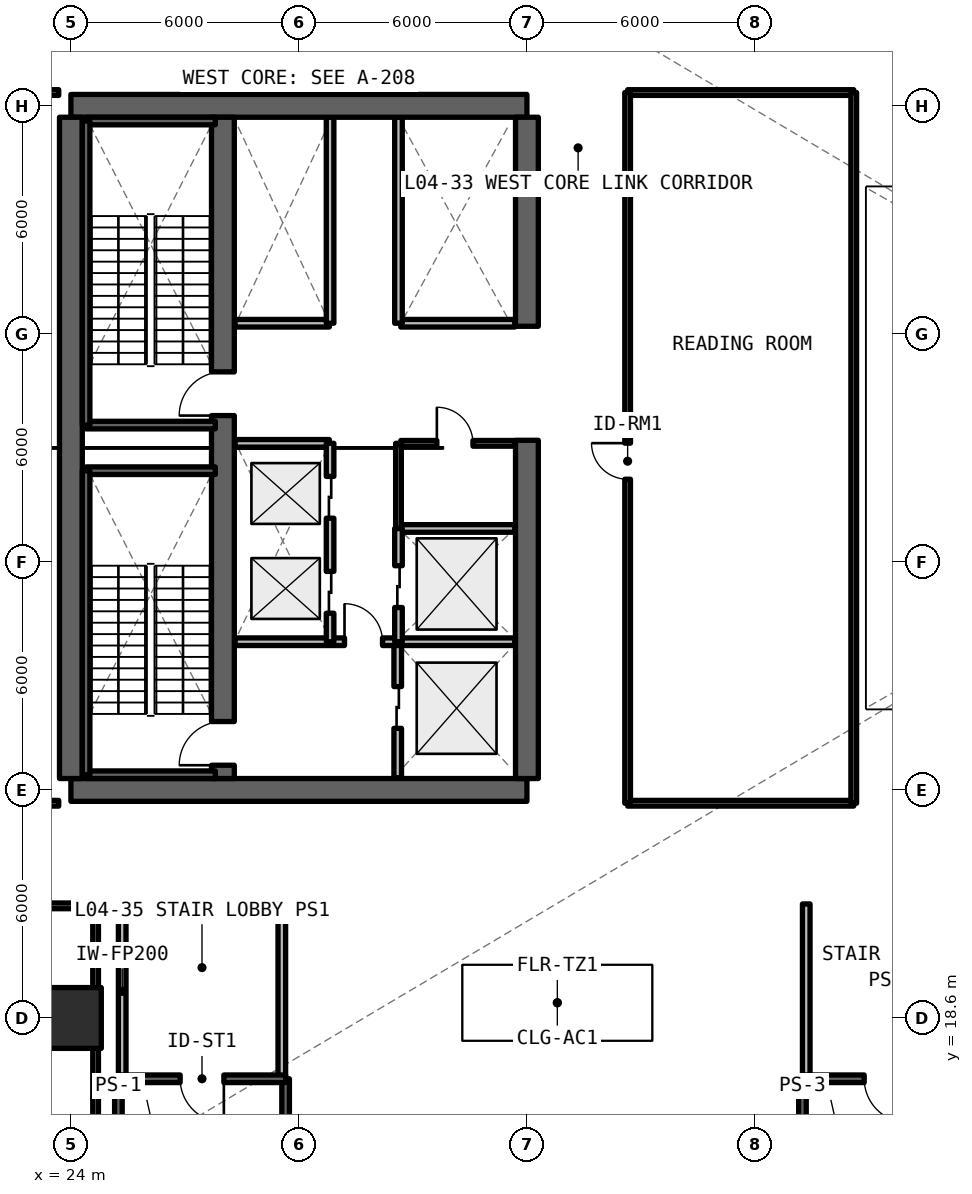
"""IFC4 building model, lengths in metres.
Left out: names, types, materials, properties, quantities, classifications, styles, units other than length and angle.
Written with IfcOpenShell. Run it as: python <this file> out.ifc"""

import sys

from ifc_helpers import new_model, si_unit, direction, frame, frame_2d, origin, origin_2d, place, context, subcontext, project, spatial, rectangle, extrude, element, fill, save


model = new_model("IFC4")
c1 = context("Model", 3, precision=1e-05, world=origin(), true_north=direction((0.0, 1.0)))
c2 = subcontext(c1, "Body", "Model", "MODEL_VIEW")
j1 = project(units=[si_unit("LENGTHUNIT", "METRE"), si_unit("PLANEANGLEUNIT", "RADIAN")], contexts=[c1])
p1 = place(None, origin())
s1 = spatial("IfcSite", under=j1, at=p1, CompositionType="ELEMENT")
p2 = place(p1, origin())
s2 = spatial("IfcBuilding", under=s1, at=p2, CompositionType="ELEMENT")
p3 = place(p2, frame((0.0, 0.0, 14.85)))
s3 = spatial("IfcBuildingStorey", under=s2, at=p3, CompositionType="ELEMENT", Elevation=14.85)
for number, where, z_axis, x_axis in (
    (1, (24.0, 24.6, 0.0), (0.0, 0.0, 1.0), (1.0, 0.0, 0.0)),
    (2, (36.0, 42.6, 0.0), (0.0, 0.0, 1.0), (-1.0, 0.0, 0.0)),
):
    element("IfcWall", number, at=place(p3, frame(where, z_axis=z_axis, x_axis=x_axis)), inside=s3, PredefinedType="SHEAR", context=c2, shape_type="SweptSolid", body=[
        extrude(rectangle(XDim=12.0, YDim=0.6, at=frame_2d((6.0, 0.0))), origin(), (0.0, 0.0, 1.0), 4.62),
    ])
p4 = place(p3, frame((24.0, 24.9, 0.0), z_axis=(0.0, 0.0, 1.0), x_axis=(0.0, 1.0, 0.0)))
e3 = element("IfcWall", 3, at=p4, inside=s3, PredefinedType="SHEAR", context=c2, shape_type="SweptSolid", body=[
    extrude(rectangle(XDim=17.4, YDim=0.6, at=frame_2d((8.7, 0.0))), origin(), (0.0, 0.0, 1.0), 4.62),
])
p5 = place(p3, frame((36.0, 24.9, 0.0), z_axis=(0.0, 0.0, 1.0), x_axis=(0.0, 1.0, 0.0)))
e4 = element("IfcWall", 4, at=p5, inside=s3, PredefinedType="SHEAR", context=c2, shape_type="SweptSolid", body=[
    extrude(rectangle(XDim=8.9, YDim=0.6, at=frame_2d((4.45, 0.0))), origin(), (0.0, 0.0, 1.0), 4.62),
])
p6 = place(p3, frame((36.0, 36.8, 0.0), z_axis=(0.0, 0.0, 1.0), x_axis=(0.0, 1.0, 0.0)))
e5 = element("IfcWall", 5, at=p6, inside=s3, PredefinedType="SHEAR", context=c2, shape_type="SweptSolid", body=[
    extrude(rectangle(XDim=5.5, YDim=0.6, at=frame_2d((2.75, 0.0))), origin(), (0.0, 0.0, 1.0), 4.62),
])
p7 = place(p3, frame((28.0, 24.9, 0.0), z_axis=(0.0, 0.0, 1.0), x_axis=(0.0, 1.0, 0.0)))
e6 = element("IfcWall", 6, at=p7, inside=s3, PredefinedType="SHEAR", context=c2, shape_type="SweptSolid", body=[
    extrude(rectangle(XDim=17.4, YDim=0.6, at=frame_2d((8.7, 0.0))), origin(), (0.0, 0.0, 1.0), 4.62),
])
p8 = place(p7, frame((0.35, 0.0, 0.0)))
e7 = element("IfcOpeningElement", 7, at=p8, cuts=e6, PredefinedType="OPENING", context=c2, shape_type="SweptSolid", body=[
    extrude(rectangle(XDim=1.15, YDim=2.15, at=frame_2d((0.575, 1.075))), frame((0.0, 0.31, 0.0), z_axis=(0.0, -1.0, 0.0), x_axis=(1.0, 0.0, 0.0)), (0.0, 0.0, 1.0), 0.62),
])
p9 = place(p7, frame((9.55, 0.0, 0.0)))
e8 = element("IfcOpeningElement", 8, at=p9, cuts=e6, PredefinedType="OPENING", context=c2, shape_type="SweptSolid", body=[
    extrude(rectangle(XDim=1.15, YDim=2.15, at=frame_2d((0.575, 1.075))), frame((0.0, 0.31, 0.0), z_axis=(0.0, -1.0, 0.0), x_axis=(1.0, 0.0, 0.0)), (0.0, 0.0, 1.0), 0.62),
])
p10 = place(p3, frame((24.0, 18.6, 0.0), z_axis=(0.0, 0.0, 1.0), x_axis=(1.0, 0.0, 0.0)))
e9 = element("IfcColumn", 9, at=p10, inside=s3, PredefinedType="COLUMN", context=c2, shape_type="SweptSolid", body=[
    extrude(rectangle(XDim=1.6, YDim=1.6, at=origin_2d()), origin(), (0.0, 0.0, 1.0), 4.62),
])
p11 = place(p3, frame((32.6, 24.92, 0.0), z_axis=(0.0, 0.0, 1.0), x_axis=(0.0, 1.0, 0.0)))
e10 = element("IfcWall", 10, at=p11, inside=s3, PredefinedType="SOLIDWALL", context=c2, shape_type="SweptSolid", body=[
    extrude(rectangle(XDim=3.58, YDim=0.2, at=frame_2d((1.79, 0.0))), origin(), (0.0, 0.0, 1.0), 3.56),
])
p12 = place(p11, frame((1.3, 0.0, 0.0)))
e11 = element("IfcOpeningElement", 11, at=p12, cuts=e10, PredefinedType="OPENING", context=c2, shape_type="SweptSolid", body=[
    extrude(rectangle(XDim=1.1, YDim=2.2, at=frame_2d((0.55, 1.1))), frame((0.0, 0.11, 0.0), z_axis=(0.0, -1.0, 0.0), x_axis=(1.0, 0.0, 0.0)), (0.0, 0.0, 1.0), 0.22),
])
p13 = place(p3, frame((28.32, 28.5, 0.0), z_axis=(0.0, 0.0, 1.0), x_axis=(1.0, 0.0, 0.0)))
e12 = element("IfcWall", 12, at=p13, inside=s3, PredefinedType="SOLIDWALL", context=c2, shape_type="SweptSolid", body=[
    extrude(rectangle(XDim=7.36, YDim=0.2, at=frame_2d((3.68, 0.0))), origin(), (0.0, 0.0, 1.0), 3.56),
])
p14 = place(p13, frame((2.88, 0.0, 0.0)))
e13 = element("IfcOpeningElement", 13, at=p14, cuts=e12, PredefinedType="OPENING", context=c2, shape_type="SweptSolid", body=[
    extrude(rectangle(XDim=1.0, YDim=2.15, at=frame_2d((0.5, 1.075))), frame((0.0, 0.11, 0.0), z_axis=(0.0, -1.0, 0.0), x_axis=(1.0, 0.0, 0.0)), (0.0, 0.0, 1.0), 0.22),
])
p15 = place(p3, frame((28.32, 33.72, 0.0), z_axis=(0.0, 0.0, 1.0), x_axis=(1.0, 0.0, 0.0)))
e14 = element("IfcWall", 14, at=p15, inside=s3, PredefinedType="SOLIDWALL", context=c2, shape_type="SweptSolid", body=[
    extrude(rectangle(XDim=2.48, YDim=0.2, at=frame_2d((1.24, 0.0))), origin(), (0.0, 0.0, 1.0), 3.56),
])
p16 = place(p3, frame((30.82, 28.5, 0.0), z_axis=(0.0, 0.0, 1.0), x_axis=(0.0, 1.0, 0.0)))
e15 = element("IfcWall", 15, at=p16, inside=s3, PredefinedType="SOLIDWALL", context=c2, shape_type="SweptSolid", body=[
    extrude(rectangle(XDim=5.22, YDim=0.2, at=frame_2d((2.61, 0.0))), origin(), (0.0, 0.0, 1.0), 3.56),
])
p17 = place(p16, frame((0.75, 0.0, 0.0)))
e16 = element("IfcOpeningElement", 16, at=p17, cuts=e15, PredefinedType="OPENING", context=c2, shape_type="SweptSolid", body=[
    extrude(rectangle(XDim=1.1, YDim=2.2, at=frame_2d((0.55, 1.1))), frame((0.0, 0.11, 0.0), z_axis=(0.0, -1.0, 0.0), x_axis=(1.0, 0.0, 0.0)), (0.0, 0.0, 1.0), 0.22),
])
p18 = place(p16, frame((3.25, 0.0, 0.0)))
e17 = element("IfcOpeningElement", 17, at=p18, cuts=e15, PredefinedType="OPENING", context=c2, shape_type="SweptSolid", body=[
    extrude(rectangle(XDim=1.1, YDim=2.2, at=frame_2d((0.55, 1.1))), frame((0.0, 0.11, 0.0), z_axis=(0.0, -1.0, 0.0), x_axis=(1.0, 0.0, 0.0)), (0.0, 0.0, 1.0), 0.22),
])
p19 = place(p3, frame((32.68, 31.48, 0.0), z_axis=(0.0, 0.0, 1.0), x_axis=(1.0, 0.0, 0.0)))
e18 = element("IfcWall", 18, at=p19, inside=s3, PredefinedType="SOLIDWALL", context=c2, shape_type="SweptSolid", body=[
    extrude(rectangle(XDim=3.0, YDim=0.2, at=frame_2d((1.5, 0.0))), origin(), (0.0, 0.0, 1.0), 3.56),
])
p20 = place(p3, frame((32.62, 28.5, 0.0), z_axis=(0.0, 0.0, 1.0), x_axis=(0.0, 1.0, 0.0)))
e19 = element("IfcWall", 19, at=p20, inside=s3, PredefinedType="SOLIDWALL", context=c2, shape_type="SweptSolid", body=[
    extrude(rectangle(XDim=2.98, YDim=0.2, at=frame_2d((1.49, 0.0))), origin(), (0.0, 0.0, 1.0), 3.56),
])
p21 = place(p20, frame((0.9, 0.0, 0.0)))
e20 = element("IfcOpeningElement", 20, at=p21, cuts=e19, PredefinedType="OPENING", context=c2, shape_type="SweptSolid", body=[
    extrude(rectangle(XDim=1.1, YDim=2.2, at=frame_2d((0.55, 1.1))), frame((0.0, 0.11, 0.0), z_axis=(0.0, -1.0, 0.0), x_axis=(1.0, 0.0, 0.0)), (0.0, 0.0, 1.0), 0.22),
])
p22 = place(p3, frame((32.62, 31.48, 0.0), z_axis=(0.0, 0.0, 1.0), x_axis=(0.0, 1.0, 0.0)))
e21 = element("IfcWall", 21, at=p22, inside=s3, PredefinedType="SOLIDWALL", context=c2, shape_type="SweptSolid", body=[
    extrude(rectangle(XDim=2.24, YDim=0.15, at=frame_2d((1.12, 0.0))), origin(), (0.0, 0.0, 1.0), 3.56),
])
p23 = place(p3, frame((32.68, 33.72, 0.0), z_axis=(0.0, 0.0, 1.0), x_axis=(1.0, 0.0, 0.0)))
e22 = element("IfcWall", 22, at=p23, inside=s3, PredefinedType="SOLIDWALL", context=c2, shape_type="SweptSolid", body=[
    extrude(rectangle(XDim=3.0, YDim=0.15, at=frame_2d((1.5, 0.0))), origin(), (0.0, 0.0, 1.0), 3.56),
])
p24 = place(p23, frame((0.95, 0.0, 0.0)))
e23 = element("IfcOpeningElement", 23, at=p24, cuts=e22, PredefinedType="OPENING", context=c2, shape_type="SweptSolid", body=[
    extrude(rectangle(XDim=0.95, YDim=2.15, at=frame_2d((0.475, 1.075))), frame((0.0, 0.085, 0.0), z_axis=(0.0, -1.0, 0.0), x_axis=(1.0, 0.0, 0.0)), (0.0, 0.0, 1.0), 0.17),
])
p25 = place(p3, frame((28.32, 36.88, 0.0), z_axis=(0.0, 0.0, 1.0), x_axis=(1.0, 0.0, 0.0)))
e24 = element("IfcWall", 24, at=p25, inside=s3, PredefinedType="SOLIDWALL", context=c2, shape_type="SweptSolid", body=[
    extrude(rectangle(XDim=2.48, YDim=0.2, at=frame_2d((1.24, 0.0))), origin(), (0.0, 0.0, 1.0), 3.56),
])
p26 = place(p3, frame((30.82, 36.88, 0.0), z_axis=(0.0, 0.0, 1.0), x_axis=(0.0, 1.0, 0.0)))
e25 = element("IfcWall", 25, at=p26, inside=s3, PredefinedType="SOLIDWALL", context=c2, shape_type="SweptSolid", body=[
    extrude(rectangle(XDim=5.42, YDim=0.2, at=frame_2d((2.71, 0.0))), origin(), (0.0, 0.0, 1.0), 3.56),
])
p27 = place(p3, frame((32.68, 36.88, 0.0), z_axis=(0.0, 0.0, 1.0), x_axis=(1.0, 0.0, 0.0)))
e26 = element("IfcWall", 26, at=p27, inside=s3, PredefinedType="SOLIDWALL", context=c2, shape_type="SweptSolid", body=[
    extrude(rectangle(XDim=3.0, YDim=0.2, at=frame_2d((1.5, 0.0))), origin(), (0.0, 0.0, 1.0), 3.56),
])
p28 = place(p3, frame((32.62, 36.88, 0.0), z_axis=(0.0, 0.0, 1.0), x_axis=(0.0, 1.0, 0.0)))
e27 = element("IfcWall", 27, at=p28, inside=s3, PredefinedType="SOLIDWALL", context=c2, shape_type="SweptSolid", body=[
    extrude(rectangle(XDim=5.42, YDim=0.2, at=frame_2d((2.71, 0.0))), origin(), (0.0, 0.0, 1.0), 3.56),
])
for number, where, z_axis, x_axis in (
    (28, (25.35, 17.0, 0.0), (0.0, 0.0, 1.0), (0.0, 1.0, 0.0)),
    (29, (29.55, 17.0, 0.0), (0.0, 0.0, 1.0), (0.0, 1.0, 0.0)),
    (30, (43.35, 17.0, 0.0), (0.0, 0.0, 1.0), (0.0, 1.0, 0.0)),
):
    element("IfcWall", number, at=place(p3, frame(where, z_axis=z_axis, x_axis=x_axis)), inside=s3, PredefinedType="SOLIDWALL", context=c2, shape_type="SweptSolid", body=[
        extrude(rectangle(XDim=4.6, YDim=0.2, at=frame_2d((2.3, 0.0))), origin(), (0.0, 0.0, 1.0), 3.56),
    ])
p29 = place(p3, frame((8.35, 21.55, 0.0), z_axis=(0.0, 0.0, 1.0), x_axis=(1.0, 0.0, 0.0)))
e31 = element("IfcWall", 31, at=p29, inside=s3, PredefinedType="SOLIDWALL", context=c2, shape_type="SweptSolid", body=[
    extrude(rectangle(XDim=16.3, YDim=0.15, at=frame_2d((8.15, 0.0))), origin(), (0.0, 0.0, 1.0), 3.56),
])
p30 = place(p29, frame((7.6, 0.0, 0.0)))
e32 = element("IfcOpeningElement", 32, at=p30, cuts=e31, PredefinedType="OPENING", context=c2, shape_type="SweptSolid", body=[
    extrude(rectangle(XDim=1.1, YDim=2.15, at=frame_2d((0.55, 1.075))), frame((0.0, 0.085, 0.0), z_axis=(0.0, -1.0, 0.0), x_axis=(1.0, 0.0, 0.0)), (0.0, 0.0, 1.0), 0.17),
])
p31 = place(p3, frame((24.65, 3.14, 0.0), z_axis=(0.0, 0.0, 1.0), x_axis=(0.0, 1.0, 0.0)))
e33 = element("IfcWall", 33, at=p31, inside=s3, PredefinedType="SOLIDWALL", context=c2, shape_type="SweptSolid", body=[
    extrude(rectangle(XDim=18.41, YDim=0.15, at=frame_2d((9.205, 0.0))), origin(), (0.0, 0.0, 1.0), 3.56),
])
for number, where, z_axis, x_axis in (
    (34, (38.65, 24.25, 0.0), (0.0, 0.0, 1.0), (1.0, 0.0, 0.0)),
    (35, (38.65, 42.95, 0.0), (0.0, 0.0, 1.0), (1.0, 0.0, 0.0)),
):
    element("IfcWall", number, at=place(p3, frame(where, z_axis=z_axis, x_axis=x_axis)), inside=s3, PredefinedType="SOLIDWALL", context=c2, shape_type="SweptSolid", body=[
        extrude(rectangle(XDim=5.95, YDim=0.15, at=frame_2d((2.975, 0.0))), origin(), (0.0, 0.0, 1.0), 3.56),
    ])
p32 = place(p3, frame((38.65, 24.25, 0.0), z_axis=(0.0, 0.0, 1.0), x_axis=(0.0, 1.0, 0.0)))
e36 = element("IfcWall", 36, at=p32, inside=s3, PredefinedType="SOLIDWALL", context=c2, shape_type="SweptSolid", body=[
    extrude(rectangle(XDim=18.7, YDim=0.15, at=frame_2d((9.35, 0.0))), origin(), (0.0, 0.0, 1.0), 3.56),
])
p33 = place(p32, frame((8.525, 0.0, 0.0)))
e37 = element("IfcOpeningElement", 37, at=p33, cuts=e36, PredefinedType="OPENING", context=c2, shape_type="SweptSolid", body=[
    extrude(rectangle(XDim=0.95, YDim=2.15, at=frame_2d((0.475, 1.075))), frame((0.0, 0.085, 0.0), z_axis=(0.0, -1.0, 0.0), x_axis=(1.0, 0.0, 0.0)), (0.0, 0.0, 1.0), 0.17),
])
p34 = place(p3, frame((44.6, 24.25, 0.0), z_axis=(0.0, 0.0, 1.0), x_axis=(0.0, 1.0, 0.0)))
e38 = element("IfcWall", 38, at=p34, inside=s3, PredefinedType="SOLIDWALL", context=c2, shape_type="SweptSolid", body=[
    extrude(rectangle(XDim=18.7, YDim=0.15, at=frame_2d((9.35, 0.0))), origin(), (0.0, 0.0, 1.0), 3.56),
])
p35 = place(p3, frame((8.4, 24.25, 0.0), z_axis=(0.0, 0.0, 1.0), x_axis=(1.0, 0.0, 0.0)))
e39 = element("IfcWall", 39, at=p35, inside=s3, PredefinedType="SOLIDWALL", context=c2, shape_type="SweptSolid", body=[
    extrude(rectangle(XDim=15.28, YDim=0.15, at=frame_2d((7.64, 0.0))), origin(), (0.0, 0.0, 1.0), 3.56),
])
p36 = place(p35, frame((7.09, 0.0, 0.0)))
e40 = element("IfcOpeningElement", 40, at=p36, cuts=e39, PredefinedType="OPENING", context=c2, shape_type="SweptSolid", body=[
    extrude(rectangle(XDim=1.1, YDim=2.15, at=frame_2d((0.55, 1.075))), frame((0.0, 0.085, 0.0), z_axis=(0.0, -1.0, 0.0), x_axis=(1.0, 0.0, 0.0)), (0.0, 0.0, 1.0), 0.17),
])
p37 = place(p3, frame((8.4, 42.95, 0.0), z_axis=(0.0, 0.0, 1.0), x_axis=(1.0, 0.0, 0.0)))
e41 = element("IfcWall", 41, at=p37, inside=s3, PredefinedType="SOLIDWALL", context=c2, shape_type="SweptSolid", body=[
    extrude(rectangle(XDim=15.28, YDim=0.15, at=frame_2d((7.64, 0.0))), origin(), (0.0, 0.0, 1.0), 3.56),
])
for number, where, z_axis, x_axis in (
    (42, (24.4, 25.0, 0.0), (0.0, 0.0, 1.0), (1.0, 0.0, 0.0)),
    (43, (27.8, 33.0, 0.0), (0.0, 0.0, 1.0), (-1.0, 0.0, 0.0)),
):
    element("IfcWall", number, at=place(p3, frame(where, z_axis=z_axis, x_axis=x_axis)), inside=s3, PredefinedType="SOLIDWALL", context=c2, shape_type="SweptSolid", body=[
        extrude(rectangle(XDim=3.4, YDim=0.2, at=frame_2d((1.7, 0.0))), origin(), (0.0, 0.0, 1.0), 4.62),
    ])
p38 = place(p3, frame((24.4, 33.0, 0.0), z_axis=(0.0, 0.0, 1.0), x_axis=(0.0, -1.0, 0.0)))
e44 = element("IfcWall", 44, at=p38, inside=s3, PredefinedType="SOLIDWALL", context=c2, shape_type="SweptSolid", body=[
    extrude(rectangle(XDim=8.0, YDim=0.2, at=frame_2d((4.0, 0.0))), origin(), (0.0, 0.0, 1.0), 4.62),
])
for number, where, z_axis, x_axis in (
    (45, (24.4, 34.2, 0.0), (0.0, 0.0, 1.0), (1.0, 0.0, 0.0)),
    (46, (27.8, 42.2, 0.0), (0.0, 0.0, 1.0), (-1.0, 0.0, 0.0)),
):
    element("IfcWall", number, at=place(p3, frame(where, z_axis=z_axis, x_axis=x_axis)), inside=s3, PredefinedType="SOLIDWALL", context=c2, shape_type="SweptSolid", body=[
        extrude(rectangle(XDim=3.4, YDim=0.2, at=frame_2d((1.7, 0.0))), origin(), (0.0, 0.0, 1.0), 4.62),
    ])
p39 = place(p3, frame((24.4, 42.2, 0.0), z_axis=(0.0, 0.0, 1.0), x_axis=(0.0, -1.0, 0.0)))
e47 = element("IfcWall", 47, at=p39, inside=s3, PredefinedType="SOLIDWALL", context=c2, shape_type="SweptSolid", body=[
    extrude(rectangle(XDim=8.0, YDim=0.2, at=frame_2d((4.0, 0.0))), origin(), (0.0, 0.0, 1.0), 4.62),
])
p40 = place(p3, frame((29.65, 8.4, 0.0), z_axis=(0.0, 0.0, 1.0), x_axis=(0.0, 1.0, 0.0)))
e48 = element("IfcWall", 48, at=p40, inside=s3, PredefinedType="SOLIDWALL", context=c2, shape_type="SweptSolid", body=[
    extrude(rectangle(XDim=8.6, YDim=0.2, at=frame_2d((4.3, 0.0))), origin(), (0.0, 0.0, 1.0), 4.62),
])
p41 = place(p3, frame((29.65, 17.0, 0.0), z_axis=(0.0, 0.0, 1.0), x_axis=(-1.0, 0.0, 0.0)))
e49 = element("IfcWall", 49, at=p41, inside=s3, PredefinedType="SOLIDWALL", context=c2, shape_type="SweptSolid", body=[
    extrude(rectangle(XDim=4.4, YDim=0.2, at=frame_2d((2.2, 0.0))), origin(), (0.0, 0.0, 1.0), 4.62),
])
p42 = place(p41, frame((1.625, 0.0, 0.0)))
e50 = element("IfcOpeningElement", 50, at=p42, cuts=e49, PredefinedType="OPENING", context=c2, shape_type="SweptSolid", body=[
    extrude(rectangle(XDim=1.15, YDim=2.15, at=frame_2d((0.575, 1.075))), frame((0.0, 0.11, 0.0), z_axis=(0.0, -1.0, 0.0), x_axis=(1.0, 0.0, 0.0)), (0.0, 0.0, 1.0), 0.22),
])
p43 = place(p3, frame((25.25, 17.0, 0.0), z_axis=(0.0, 0.0, 1.0), x_axis=(0.0, -1.0, 0.0)))
e51 = element("IfcWall", 51, at=p43, inside=s3, PredefinedType="SOLIDWALL", context=c2, shape_type="SweptSolid", body=[
    extrude(rectangle(XDim=8.6, YDim=0.2, at=frame_2d((4.3, 0.0))), origin(), (0.0, 0.0, 1.0), 4.62),
])
p44 = place(p3, frame((47.65, 17.0, 0.0), z_axis=(0.0, 0.0, 1.0), x_axis=(-1.0, 0.0, 0.0)))
e52 = element("IfcWall", 52, at=p44, inside=s3, PredefinedType="SOLIDWALL", context=c2, shape_type="SweptSolid", body=[
    extrude(rectangle(XDim=4.4, YDim=0.2, at=frame_2d((2.2, 0.0))), origin(), (0.0, 0.0, 1.0), 4.62),
])
p45 = place(p44, frame((1.625, 0.0, 0.0)))
e53 = element("IfcOpeningElement", 53, at=p45, cuts=e52, PredefinedType="OPENING", context=c2, shape_type="SweptSolid", body=[
    extrude(rectangle(XDim=1.15, YDim=2.15, at=frame_2d((0.575, 1.075))), frame((0.0, 0.11, 0.0), z_axis=(0.0, -1.0, 0.0), x_axis=(1.0, 0.0, 0.0)), (0.0, 0.0, 1.0), 0.22),
])
p46 = place(p3, frame((43.25, 17.0, 0.0), z_axis=(0.0, 0.0, 1.0), x_axis=(0.0, -1.0, 0.0)))
e54 = element("IfcWall", 54, at=p46, inside=s3, PredefinedType="SOLIDWALL", context=c2, shape_type="SweptSolid", body=[
    extrude(rectangle(XDim=8.6, YDim=0.2, at=frame_2d((4.3, 0.0))), origin(), (0.0, 0.0, 1.0), 4.62),
])
p47 = place(p12, origin())
e55 = element("IfcDoor", 55, at=p47, inside=s3, OperationType="SLIDING_TO_LEFT", PredefinedType="DOOR", context=c2, shape_type="SweptSolid", body=[
    extrude(rectangle(XDim=1.1, YDim=2.2, at=frame_2d((0.55, 1.1))), frame((0.0, 0.025, 0.0), z_axis=(0.0, -1.0, 0.0), x_axis=(1.0, 0.0, 0.0)), (0.0, 0.0, 1.0), 0.05),
])
fill(e11, e55)
p48 = place(p14, origin())
e56 = element("IfcDoor", 56, at=p48, inside=s3, OperationType="SINGLE_SWING_LEFT", PredefinedType="DOOR", context=c2, shape_type="SweptSolid", body=[
    extrude(rectangle(XDim=1.0, YDim=2.15, at=frame_2d((0.5, 1.075))), frame((0.0, 0.025, 0.0), z_axis=(0.0, -1.0, 0.0), x_axis=(1.0, 0.0, 0.0)), (0.0, 0.0, 1.0), 0.05),
])
fill(e13, e56)
p49 = place(p17, origin())
e57 = element("IfcDoor", 57, at=p49, inside=s3, OperationType="SLIDING_TO_LEFT", PredefinedType="DOOR", context=c2, shape_type="SweptSolid", body=[
    extrude(rectangle(XDim=1.1, YDim=2.2, at=frame_2d((0.55, 1.1))), frame((0.0, 0.025, 0.0), z_axis=(0.0, -1.0, 0.0), x_axis=(1.0, 0.0, 0.0)), (0.0, 0.0, 1.0), 0.05),
])
fill(e16, e57)
p50 = place(p18, origin())
e58 = element("IfcDoor", 58, at=p50, inside=s3, OperationType="SLIDING_TO_RIGHT", PredefinedType="DOOR", context=c2, shape_type="SweptSolid", body=[
    extrude(rectangle(XDim=1.1, YDim=2.2, at=frame_2d((0.55, 1.1))), frame((0.0, 0.025, 0.0), z_axis=(0.0, -1.0, 0.0), x_axis=(1.0, 0.0, 0.0)), (0.0, 0.0, 1.0), 0.05),
])
fill(e17, e58)
p51 = place(p21, origin())
e59 = element("IfcDoor", 59, at=p51, inside=s3, OperationType="SLIDING_TO_LEFT", PredefinedType="DOOR", context=c2, shape_type="SweptSolid", body=[
    extrude(rectangle(XDim=1.1, YDim=2.2, at=frame_2d((0.55, 1.1))), frame((0.0, 0.025, 0.0), z_axis=(0.0, -1.0, 0.0), x_axis=(1.0, 0.0, 0.0)), (0.0, 0.0, 1.0), 0.05),
])
fill(e20, e59)
p52 = place(p24, origin())
e60 = element("IfcDoor", 60, at=p52, inside=s3, OperationType="SINGLE_SWING_LEFT", PredefinedType="DOOR", context=c2, shape_type="SweptSolid", body=[
    extrude(rectangle(XDim=0.95, YDim=2.15, at=frame_2d((0.475, 1.075))), frame((0.0, 0.025, 0.0), z_axis=(0.0, -1.0, 0.0), x_axis=(1.0, 0.0, 0.0)), (0.0, 0.0, 1.0), 0.05),
])
fill(e23, e60)
p53 = place(p33, origin())
e61 = element("IfcDoor", 61, at=p53, inside=s3, OperationType="SINGLE_SWING_RIGHT", PredefinedType="DOOR", context=c2, shape_type="SweptSolid", body=[
    extrude(rectangle(XDim=0.95, YDim=2.15, at=frame_2d((0.475, 1.075))), frame((0.0, 0.025, 0.0), z_axis=(0.0, -1.0, 0.0), x_axis=(1.0, 0.0, 0.0)), (0.0, 0.0, 1.0), 0.05),
])
fill(e37, e61)
p54 = place(p8, origin())
e62 = element("IfcDoor", 62, at=p54, inside=s3, OperationType="SINGLE_SWING_RIGHT", PredefinedType="DOOR", context=c2, shape_type="SweptSolid", body=[
    extrude(rectangle(XDim=1.15, YDim=2.15, at=frame_2d((0.575, 1.075))), frame((0.0, 0.025, 0.0), z_axis=(0.0, -1.0, 0.0), x_axis=(1.0, 0.0, 0.0)), (0.0, 0.0, 1.0), 0.05),
])
fill(e7, e62)
p55 = place(p9, origin())
e63 = element("IfcDoor", 63, at=p55, inside=s3, OperationType="SINGLE_SWING_LEFT", PredefinedType="DOOR", context=c2, shape_type="SweptSolid", body=[
    extrude(rectangle(XDim=1.15, YDim=2.15, at=frame_2d((0.575, 1.075))), frame((0.0, 0.025, 0.0), z_axis=(0.0, -1.0, 0.0), x_axis=(1.0, 0.0, 0.0)), (0.0, 0.0, 1.0), 0.05),
])
fill(e8, e63)
p56 = place(p42, origin())
e64 = element("IfcDoor", 64, at=p56, inside=s3, OperationType="SINGLE_SWING_RIGHT", PredefinedType="DOOR", context=c2, shape_type="SweptSolid", body=[
    extrude(rectangle(XDim=1.15, YDim=2.15, at=frame_2d((0.575, 1.075))), frame((0.0, 0.025, 0.0), z_axis=(0.0, -1.0, 0.0), x_axis=(1.0, 0.0, 0.0)), (0.0, 0.0, 1.0), 0.05),
])
fill(e50, e64)
p57 = place(p45, origin())
e65 = element("IfcDoor", 65, at=p57, inside=s3, OperationType="SINGLE_SWING_RIGHT", PredefinedType="DOOR", context=c2, shape_type="SweptSolid", body=[
    extrude(rectangle(XDim=1.15, YDim=2.15, at=frame_2d((0.575, 1.075))), frame((0.0, 0.025, 0.0), z_axis=(0.0, -1.0, 0.0), x_axis=(1.0, 0.0, 0.0)), (0.0, 0.0, 1.0), 0.05),
])
fill(e53, e65)
save(model, sys.argv[1])
